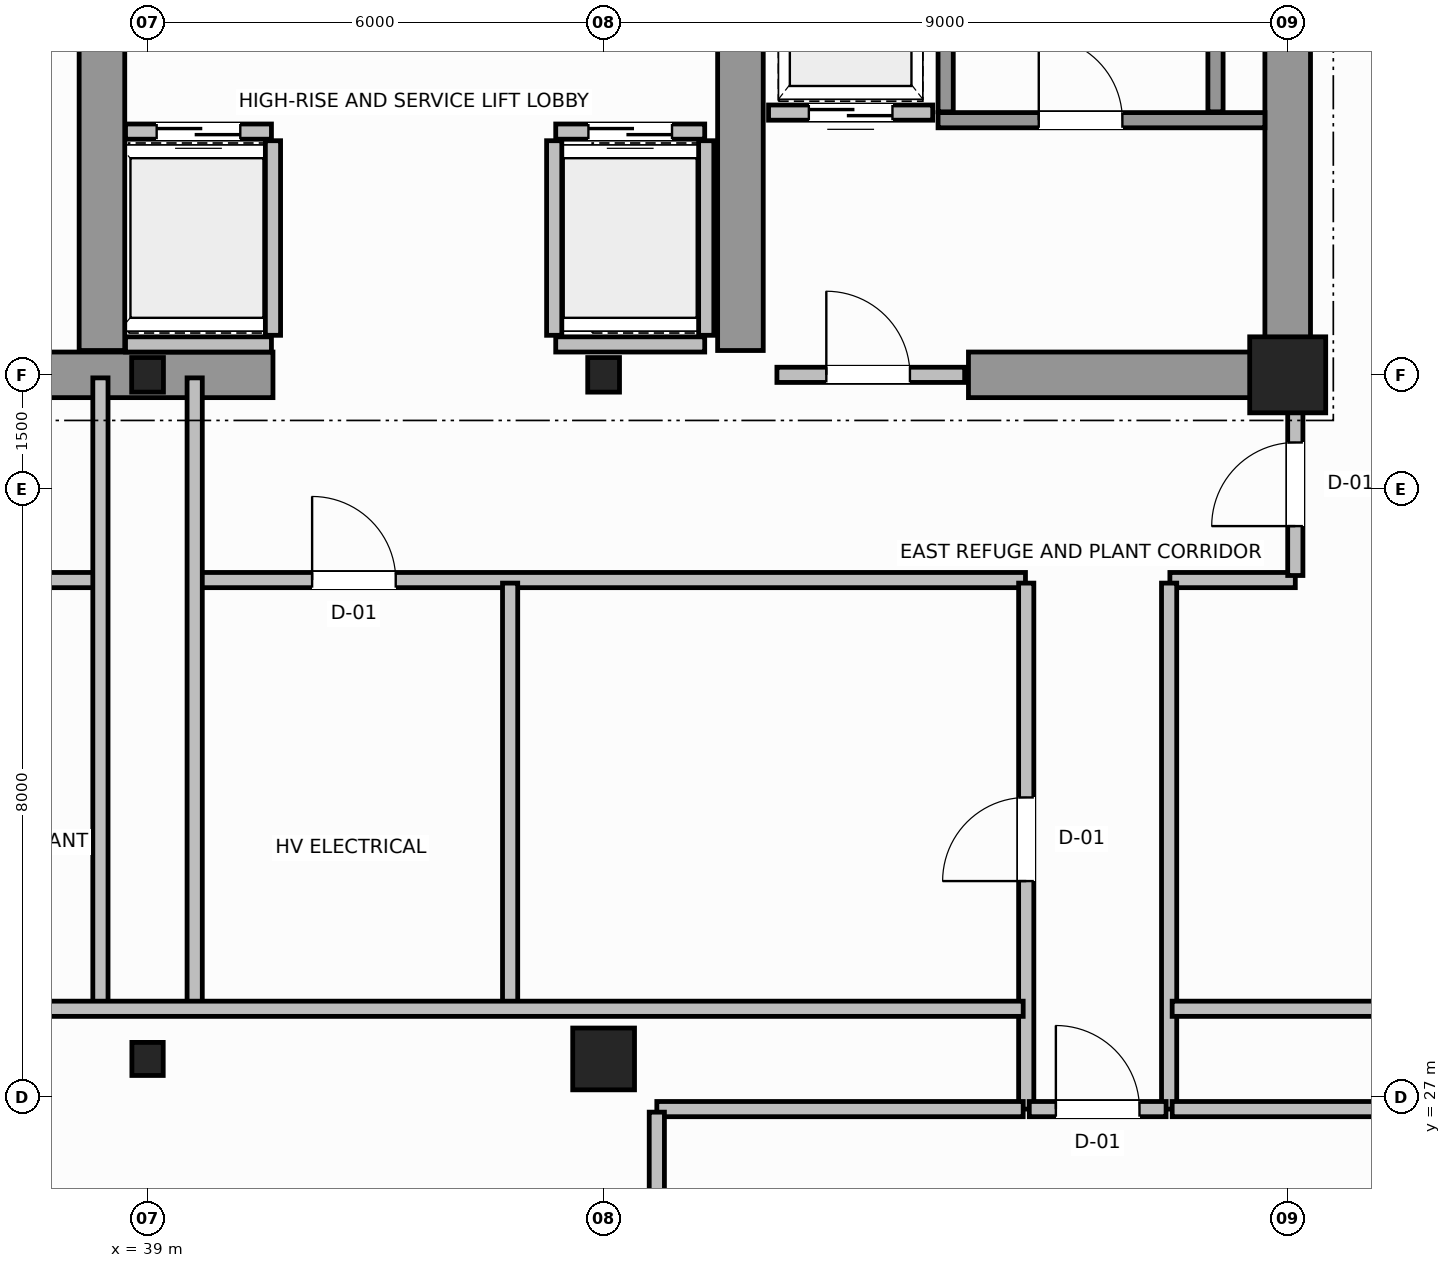
"""IFC4 building model, lengths in metres.
Left out: names, types, materials, properties, quantities, classifications, styles, units other than length and angle.
Written with IfcOpenShell. Run it as: python <this file> out.ifc"""

import sys

from ifc_helpers import new_model, si_unit, direction, frame, frame_2d, origin, origin_2d, place, context, subcontext, project, spatial, rectangle, hollow_circle, i_section, extrude, source, transform, mapped, element, fill, save


model = new_model("IFC4")
c1 = context("Model", 3, precision=1e-05, world=origin(), true_north=direction((0.0, 1.0)))
c2 = subcontext(c1, "Body", "Model", "MODEL_VIEW")
j1 = project(units=[si_unit("LENGTHUNIT", "METRE"), si_unit("PLANEANGLEUNIT", "RADIAN")], contexts=[c1])
p1 = place(None, origin())
s1 = spatial("IfcSite", under=j1, at=p1, CompositionType="ELEMENT")
p2 = place(p1, origin())
s2 = spatial("IfcBuilding", under=s1, at=p2, CompositionType="ELEMENT")
p3 = place(p2, frame((0.0, 0.0, 218.4)))
s3 = spatial("IfcBuildingStorey", under=s2, at=p3, CompositionType="ELEMENT", Elevation=218.4)
m1 = source(origin(), c2, "Body", "SweptSolid", [
    extrude(i_section(OverallWidth=0.418, OverallDepth=0.455, WebThickness=0.042, FlangeThickness=0.058, FilletRadius=0.015, at=origin_2d()), origin(), (0.0, 0.0, 1.0), 4.8),
])
for number, where, z_axis, x_axis in (
    (1, (39.0, 36.5, 0.0), (0.0, 0.0, 1.0), (1.0, 0.0, 0.0)),
    (2, (45.0, 36.5, 0.0), (0.0, 0.0, 1.0), (1.0, 0.0, 0.0)),
):
    element("IfcColumn", number, at=place(p3, frame(where, z_axis=z_axis, x_axis=x_axis)), inside=s3, PredefinedType="COLUMN", context=c2, shape_type="MappedRepresentation", body=[
        mapped(m1, transform((0.0, 0.0, 0.0), scale=1.0)),
    ])
m2 = source(origin(), c2, "Body", "SweptSolid", [
    extrude(rectangle(XDim=1.0, YDim=1.0, at=origin_2d()), origin(), (0.0, 0.0, 1.0), 4.8),
])
p4 = place(p3, frame((54.0, 36.5, 0.0), z_axis=(0.0, 0.0, 1.0), x_axis=(1.0, 0.0, 0.0)))
e3 = element("IfcColumn", 3, at=p4, inside=s3, PredefinedType="COLUMN", context=c2, shape_type="MappedRepresentation", body=[
    mapped(m2, transform((0.0, 0.0, 0.0), scale=1.0)),
])
m3 = source(origin(), c2, "Body", "SweptSolid", [
    extrude(i_section(OverallWidth=0.412, OverallDepth=0.435, WebThickness=0.036, FlangeThickness=0.05, FilletRadius=0.015, at=origin_2d()), origin(), (0.0, 0.0, 1.0), 4.8),
])
p5 = place(p3, frame((39.0, 27.5, 0.0), z_axis=(0.0, 0.0, 1.0), x_axis=(1.0, 0.0, 0.0)))
e4 = element("IfcColumn", 4, at=p5, inside=s3, PredefinedType="COLUMN", context=c2, shape_type="MappedRepresentation", body=[
    mapped(m3, transform((0.0, 0.0, 0.0), scale=1.0)),
])
m4 = source(origin(), c2, "Body", "SweptSolid", [
    extrude(hollow_circle(Radius=0.406, WallThickness=0.04, at=origin_2d()), origin(), (0.0, 0.0, 1.0), 4.8),
])
p6 = place(p3, frame((45.0, 27.5, 0.0), z_axis=(0.0, 0.0, 1.0), x_axis=(1.0, 0.0, 0.0)))
e5 = element("IfcColumn", 5, at=p6, inside=s3, PredefinedType="COLUMN", context=c2, shape_type="MappedRepresentation", body=[
    mapped(m4, transform((0.0, 0.0, 0.0), scale=1.0)),
])
p7 = place(p3, frame((54.0, 36.5, 0.0), z_axis=(0.0, 0.0, 1.0), x_axis=(0.0, 1.0, 0.0)))
e6 = element("IfcWall", 6, at=p7, inside=s3, PredefinedType="SHEAR", context=c2, shape_type="SweptSolid", body=[
    extrude(rectangle(XDim=14.5, YDim=0.6, at=frame_2d((7.25, 0.0))), origin(), (0.0, 0.0, 1.0), 4.8),
])
p8 = place(p3, frame((36.15, 36.5, 0.0), z_axis=(0.0, 0.0, 1.0), x_axis=(1.0, 0.0, 0.0)))
e7 = element("IfcWall", 7, at=p8, inside=s3, PredefinedType="SHEAR", context=c2, shape_type="SweptSolid", body=[
    extrude(rectangle(XDim=4.5, YDim=0.6, at=frame_2d((2.25, 0.0))), origin(), (0.0, 0.0, 1.0), 4.8),
])
p9 = place(p3, frame((49.8, 36.5, 0.0), z_axis=(0.0, 0.0, 1.0), x_axis=(1.0, 0.0, 0.0)))
e8 = element("IfcWall", 8, at=p9, inside=s3, PredefinedType="SHEAR", context=c2, shape_type="SweptSolid", body=[
    extrude(rectangle(XDim=3.88, YDim=0.6, at=frame_2d((1.94, 0.0))), origin(), (0.0, 0.0, 1.0), 3.54),
])
p10 = place(p3, frame((38.4, 36.82, 0.0), z_axis=(0.0, 0.0, 1.0), x_axis=(0.0, 1.0, 0.0)))
e9 = element("IfcWall", 9, at=p10, inside=s3, PredefinedType="SHEAR", context=c2, shape_type="SweptSolid", body=[
    extrude(rectangle(XDim=9.38, YDim=0.6, at=frame_2d((4.69, 0.0))), origin(), (0.0, 0.0, 1.0), 4.8),
])
p11 = place(p10, frame((4.05, 0.0, 0.0)))
e10 = element("IfcOpeningElement", 10, at=p11, cuts=e9, PredefinedType="OPENING", context=c2, shape_type="SweptSolid", body=[
    extrude(rectangle(XDim=1.1, YDim=2.15, at=frame_2d((0.55, 1.075))), frame((0.0, 0.31, 0.0), z_axis=(0.0, -1.0, 0.0), x_axis=(1.0, 0.0, 0.0)), (0.0, 0.0, 1.0), 0.62),
])
p12 = place(p3, frame((46.8, 36.82, 0.0), z_axis=(0.0, 0.0, 1.0), x_axis=(0.0, 1.0, 0.0)))
e11 = element("IfcWall", 11, at=p12, inside=s3, PredefinedType="SHEAR", context=c2, shape_type="SweptSolid", body=[
    extrude(rectangle(XDim=9.38, YDim=0.6, at=frame_2d((4.69, 0.0))), origin(), (0.0, 0.0, 1.0), 4.8),
])
p13 = place(p3, frame((49.4, 39.85, 0.0), z_axis=(0.0, 0.0, 1.0), x_axis=(1.0, 0.0, 0.0)))
e12 = element("IfcWall", 12, at=p13, inside=s3, PredefinedType="SOLIDWALL", context=c2, shape_type="SweptSolid", body=[
    extrude(rectangle(XDim=4.3, YDim=0.2, at=frame_2d((2.15, 0.0))), origin(), (0.0, 0.0, 1.0), 4.8),
])
p14 = place(p13, frame((1.325, 0.0, 0.0)))
e13 = element("IfcOpeningElement", 13, at=p14, cuts=e12, PredefinedType="OPENING", context=c2, shape_type="SweptSolid", body=[
    extrude(rectangle(XDim=1.1, YDim=2.15, at=frame_2d((0.55, 1.075))), frame((0.0, 0.11, 0.0), z_axis=(0.0, -1.0, 0.0), x_axis=(1.0, 0.0, 0.0)), (0.0, 0.0, 1.0), 0.22),
])
for number, where, z_axis, x_axis in (
    (14, (49.5, 39.96, 0.0), (0.0, 0.0, 1.0), (0.0, 1.0, 0.0)),
    (15, (53.05, 39.96, 0.0), (0.0, 0.0, 1.0), (0.0, 1.0, 0.0)),
):
    element("IfcWall", number, at=place(p3, frame(where, z_axis=z_axis, x_axis=x_axis)), inside=s3, PredefinedType="SOLIDWALL", context=c2, shape_type="SweptSolid", body=[
        extrude(rectangle(XDim=9.93, YDim=0.2, at=frame_2d((4.965, 0.0))), origin(), (0.0, 0.0, 1.0), 4.8),
    ])
p15 = place(p3, frame((47.28, 36.5, 0.0), z_axis=(0.0, 0.0, 1.0), x_axis=(1.0, 0.0, 0.0)))
e16 = element("IfcWall", 16, at=p15, inside=s3, PredefinedType="SOLIDWALL", context=c2, shape_type="SweptSolid", body=[
    extrude(rectangle(XDim=2.47, YDim=0.2, at=frame_2d((1.235, 0.0))), origin(), (0.0, 0.0, 1.0), 3.53),
])
p16 = place(p15, frame((0.65, 0.0, 0.0)))
e17 = element("IfcOpeningElement", 17, at=p16, cuts=e16, PredefinedType="OPENING", context=c2, shape_type="SweptSolid", body=[
    extrude(rectangle(XDim=1.1, YDim=2.15, at=frame_2d((0.55, 1.075))), frame((0.0, 0.11, 0.0), z_axis=(0.0, -1.0, 0.0), x_axis=(1.0, 0.0, 0.0)), (0.0, 0.0, 1.0), 0.22),
])
p17 = place(p3, frame((38.71, 39.7, 0.0), z_axis=(0.0, 0.0, 1.0), x_axis=(1.0, 0.0, 0.0)))
e18 = element("IfcWall", 18, at=p17, inside=s3, PredefinedType="SOLIDWALL", context=c2, shape_type="SweptSolid", body=[
    extrude(rectangle(XDim=1.92, YDim=0.2, at=frame_2d((0.96, 0.0))), origin(), (0.0, 0.0, 1.0), 4.54),
])
p18 = place(p17, frame((0.41, 0.0, 0.0)))
e19 = element("IfcOpeningElement", 19, at=p18, cuts=e18, PredefinedType="OPENING", context=c2, shape_type="SweptSolid", body=[
    extrude(rectangle(XDim=1.1, YDim=2.15, at=frame_2d((0.55, 1.075))), frame((0.0, 0.11, 0.0), z_axis=(0.0, -1.0, 0.0), x_axis=(1.0, 0.0, 0.0)), (0.0, 0.0, 1.0), 0.22),
])
p19 = place(p3, frame((38.71, 36.9, 0.0), z_axis=(0.0, 0.0, 1.0), x_axis=(1.0, 0.0, 0.0)))
e20 = element("IfcWall", 20, at=p19, inside=s3, PredefinedType="SOLIDWALL", context=c2, shape_type="SweptSolid", body=[
    extrude(rectangle(XDim=1.92, YDim=0.2, at=frame_2d((0.96, 0.0))), origin(), (0.0, 0.0, 1.0), 4.54),
])
p20 = place(p3, frame((40.65, 37.02, 0.0), z_axis=(0.0, 0.0, 1.0), x_axis=(0.0, 1.0, 0.0)))
e21 = element("IfcWall", 21, at=p20, inside=s3, PredefinedType="SOLIDWALL", context=c2, shape_type="SweptSolid", body=[
    extrude(rectangle(XDim=2.56, YDim=0.2, at=frame_2d((1.28, 0.0))), origin(), (0.0, 0.0, 1.0), 4.54),
])
p21 = place(p3, frame((44.37, 39.7, 0.0), z_axis=(0.0, 0.0, 1.0), x_axis=(1.0, 0.0, 0.0)))
e22 = element("IfcWall", 22, at=p21, inside=s3, PredefinedType="SOLIDWALL", context=c2, shape_type="SweptSolid", body=[
    extrude(rectangle(XDim=1.96, YDim=0.2, at=frame_2d((0.98, 0.0))), origin(), (0.0, 0.0, 1.0), 4.54),
])
p22 = place(p21, frame((0.43, 0.0, 0.0)))
e23 = element("IfcOpeningElement", 23, at=p22, cuts=e22, PredefinedType="OPENING", context=c2, shape_type="SweptSolid", body=[
    extrude(rectangle(XDim=1.1, YDim=2.15, at=frame_2d((0.55, 1.075))), frame((0.0, 0.11, 0.0), z_axis=(0.0, -1.0, 0.0), x_axis=(1.0, 0.0, 0.0)), (0.0, 0.0, 1.0), 0.22),
])
p23 = place(p3, frame((44.37, 36.9, 0.0), z_axis=(0.0, 0.0, 1.0), x_axis=(1.0, 0.0, 0.0)))
e24 = element("IfcWall", 24, at=p23, inside=s3, PredefinedType="SOLIDWALL", context=c2, shape_type="SweptSolid", body=[
    extrude(rectangle(XDim=1.96, YDim=0.2, at=frame_2d((0.98, 0.0))), origin(), (0.0, 0.0, 1.0), 3.53),
])
for number, where, z_axis, x_axis in (
    (25, (44.35, 37.02, 0.0), (0.0, 0.0, 1.0), (0.0, 1.0, 0.0)),
    (26, (46.35, 37.02, 0.0), (0.0, 0.0, 1.0), (0.0, 1.0, 0.0)),
):
    element("IfcWall", number, at=place(p3, frame(where, z_axis=z_axis, x_axis=x_axis)), inside=s3, PredefinedType="SOLIDWALL", context=c2, shape_type="SweptSolid", body=[
        extrude(rectangle(XDim=2.56, YDim=0.2, at=frame_2d((1.28, 0.0))), origin(), (0.0, 0.0, 1.0), 4.54),
    ])
p24 = place(p3, frame((47.17, 39.95, 0.0), z_axis=(0.0, 0.0, 1.0), x_axis=(1.0, 0.0, 0.0)))
e27 = element("IfcWall", 27, at=p24, inside=s3, PredefinedType="SOLIDWALL", context=c2, shape_type="SweptSolid", body=[
    extrude(rectangle(XDim=2.16, YDim=0.2, at=frame_2d((1.08, 0.0))), origin(), (0.0, 0.0, 1.0), 4.54),
])
p25 = place(p24, frame((0.53, 0.0, 0.0)))
e28 = element("IfcOpeningElement", 28, at=p25, cuts=e27, PredefinedType="OPENING", context=c2, shape_type="SweptSolid", body=[
    extrude(rectangle(XDim=1.1, YDim=2.15, at=frame_2d((0.55, 1.075))), frame((0.0, 0.11, 0.0), z_axis=(0.0, -1.0, 0.0), x_axis=(1.0, 0.0, 0.0)), (0.0, 0.0, 1.0), 0.22),
])
p26 = place(p3, frame((29.64, 33.8, 0.0), z_axis=(0.0, 0.0, 1.0), x_axis=(1.0, 0.0, 0.0)))
e29 = element("IfcWall", 29, at=p26, inside=s3, PredefinedType="SOLIDWALL", context=c2, shape_type="SweptSolid", body=[
    extrude(rectangle(XDim=8.72, YDim=0.2, at=frame_2d((4.36, 0.0))), origin(), (0.0, 0.0, 1.0), 4.13),
])
p27 = place(p26, frame((3.8, 0.0, 0.0)))
e30 = element("IfcOpeningElement", 30, at=p27, cuts=e29, PredefinedType="OPENING", context=c2, shape_type="SweptSolid", body=[
    extrude(rectangle(XDim=1.1, YDim=2.15, at=frame_2d((0.55, 1.075))), frame((0.0, 0.11, 0.0), z_axis=(0.0, -1.0, 0.0), x_axis=(1.0, 0.0, 0.0)), (0.0, 0.0, 1.0), 0.22),
])
p28 = place(p3, frame((39.64, 33.8, 0.0), z_axis=(0.0, 0.0, 1.0), x_axis=(1.0, 0.0, 0.0)))
e31 = element("IfcWall", 31, at=p28, inside=s3, PredefinedType="SOLIDWALL", context=c2, shape_type="SweptSolid", body=[
    extrude(rectangle(XDim=10.91, YDim=0.2, at=frame_2d((5.455, 0.0))), origin(), (0.0, 0.0, 1.0), 4.13),
])
p29 = place(p28, frame((1.525, 0.0, 0.0)))
e32 = element("IfcOpeningElement", 32, at=p29, cuts=e31, PredefinedType="OPENING", context=c2, shape_type="SweptSolid", body=[
    extrude(rectangle(XDim=1.1, YDim=2.15, at=frame_2d((0.55, 1.075))), frame((0.0, 0.11, 0.0), z_axis=(0.0, -1.0, 0.0), x_axis=(1.0, 0.0, 0.0)), (0.0, 0.0, 1.0), 0.22),
])
p30 = place(p3, frame((52.45, 33.8, 0.0), z_axis=(0.0, 0.0, 1.0), x_axis=(1.0, 0.0, 0.0)))
e33 = element("IfcWall", 33, at=p30, inside=s3, PredefinedType="SOLIDWALL", context=c2, shape_type="SweptSolid", body=[
    extrude(rectangle(XDim=1.65, YDim=0.2, at=frame_2d((0.825, 0.0))), origin(), (0.0, 0.0, 1.0), 4.13),
])
p31 = place(p3, frame((54.1, 33.86, 0.0), z_axis=(0.0, 0.0, 1.0), x_axis=(0.0, 1.0, 0.0)))
e34 = element("IfcWall", 34, at=p31, inside=s3, PredefinedType="SOLIDWALL", context=c2, shape_type="SweptSolid", body=[
    extrude(rectangle(XDim=2.58, YDim=0.2, at=frame_2d((1.29, 0.0))), origin(), (0.0, 0.0, 1.0), 4.54),
])
p32 = place(p31, frame((0.65, 0.0, 0.0)))
e35 = element("IfcOpeningElement", 35, at=p32, cuts=e34, PredefinedType="OPENING", context=c2, shape_type="SweptSolid", body=[
    extrude(rectangle(XDim=1.1, YDim=2.15, at=frame_2d((0.55, 1.075))), frame((0.0, 0.11, 0.0), z_axis=(0.0, -1.0, 0.0), x_axis=(1.0, 0.0, 0.0)), (0.0, 0.0, 1.0), 0.22),
])
p33 = place(p3, frame((50.56, 26.84, 0.0), z_axis=(0.0, 0.0, 1.0), x_axis=(0.0, 1.0, 0.0)))
e36 = element("IfcWall", 36, at=p33, inside=s3, PredefinedType="SOLIDWALL", context=c2, shape_type="SweptSolid", body=[
    extrude(rectangle(XDim=6.92, YDim=0.2, at=frame_2d((3.46, 0.0))), origin(), (0.0, 0.0, 1.0), 4.54),
])
p34 = place(p33, frame((3.0, 0.0, 0.0)))
e37 = element("IfcOpeningElement", 37, at=p34, cuts=e36, PredefinedType="OPENING", context=c2, shape_type="SweptSolid", body=[
    extrude(rectangle(XDim=1.1, YDim=2.15, at=frame_2d((0.55, 1.075))), frame((0.0, 0.11, 0.0), z_axis=(0.0, -1.0, 0.0), x_axis=(1.0, 0.0, 0.0)), (0.0, 0.0, 1.0), 0.22),
])
p35 = place(p3, frame((52.44, 26.84, 0.0), z_axis=(0.0, 0.0, 1.0), x_axis=(0.0, 1.0, 0.0)))
e38 = element("IfcWall", 38, at=p35, inside=s3, PredefinedType="SOLIDWALL", context=c2, shape_type="SweptSolid", body=[
    extrude(rectangle(XDim=6.92, YDim=0.2, at=frame_2d((3.46, 0.0))), origin(), (0.0, 0.0, 1.0), 4.54),
])
p36 = place(p3, frame((50.6, 26.84, 0.0), z_axis=(0.0, 0.0, 1.0), x_axis=(1.0, 0.0, 0.0)))
e39 = element("IfcWall", 39, at=p36, inside=s3, PredefinedType="SOLIDWALL", context=c2, shape_type="SweptSolid", body=[
    extrude(rectangle(XDim=1.8, YDim=0.2, at=frame_2d((0.9, 0.0))), origin(), (0.0, 0.0, 1.0), 4.54),
])
p37 = place(p36, frame((0.35, 0.0, 0.0)))
e40 = element("IfcOpeningElement", 40, at=p37, cuts=e39, PredefinedType="OPENING", context=c2, shape_type="SweptSolid", body=[
    extrude(rectangle(XDim=1.1, YDim=2.15, at=frame_2d((0.55, 1.075))), frame((0.0, 0.11, 0.0), z_axis=(0.0, -1.0, 0.0), x_axis=(1.0, 0.0, 0.0)), (0.0, 0.0, 1.0), 0.22),
])
for number, where, z_axis, x_axis in (
    (41, (38.38, 28.16, 0.0), (0.0, 0.0, 1.0), (0.0, 1.0, 0.0)),
    (42, (39.62, 28.16, 0.0), (0.0, 0.0, 1.0), (0.0, 1.0, 0.0)),
):
    element("IfcWall", number, at=place(p3, frame(where, z_axis=z_axis, x_axis=x_axis)), inside=s3, PredefinedType="SOLIDWALL", context=c2, shape_type="SweptSolid", body=[
        extrude(rectangle(XDim=8.3, YDim=0.2, at=frame_2d((4.15, 0.0))), origin(), (0.0, 0.0, 1.0), 4.54),
    ])
p38 = place(p3, frame((43.77, 28.16, 0.0), z_axis=(0.0, 0.0, 1.0), x_axis=(0.0, 1.0, 0.0)))
e43 = element("IfcWall", 43, at=p38, inside=s3, PredefinedType="SOLIDWALL", context=c2, shape_type="SweptSolid", body=[
    extrude(rectangle(XDim=5.6, YDim=0.2, at=frame_2d((2.8, 0.0))), origin(), (0.0, 0.0, 1.0), 4.54),
])
p39 = place(p3, frame((17.48, 28.16, 0.0), z_axis=(0.0, 0.0, 1.0), x_axis=(1.0, 0.0, 0.0)))
e44 = element("IfcWall", 44, at=p39, inside=s3, PredefinedType="SOLIDWALL", context=c2, shape_type="SweptSolid", body=[
    extrude(rectangle(XDim=33.04, YDim=0.2, at=frame_2d((16.52, 0.0))), origin(), (0.0, 0.0, 1.0), 4.54),
])
p40 = place(p3, frame((52.48, 28.16, 0.0), z_axis=(0.0, 0.0, 1.0), x_axis=(1.0, 0.0, 0.0)))
e45 = element("IfcWall", 45, at=p40, inside=s3, PredefinedType="SOLIDWALL", context=c2, shape_type="SweptSolid", body=[
    extrude(rectangle(XDim=6.681, YDim=0.2, at=frame_2d((3.34, 0.0))), origin(), (0.0, 0.0, 1.0), 4.54),
])
p41 = place(p3, frame((45.7, 26.84, 0.0), z_axis=(0.0, 0.0, 1.0), x_axis=(1.0, 0.0, 0.0)))
e46 = element("IfcWall", 46, at=p41, inside=s3, PredefinedType="SOLIDWALL", context=c2, shape_type="SweptSolid", body=[
    extrude(rectangle(XDim=4.82, YDim=0.2, at=frame_2d((2.41, 0.0))), origin(), (0.0, 0.0, 1.0), 4.54),
])
p42 = place(p3, frame((52.48, 26.84, 0.0), z_axis=(0.0, 0.0, 1.0), x_axis=(1.0, 0.0, 0.0)))
e47 = element("IfcWall", 47, at=p42, inside=s3, PredefinedType="SOLIDWALL", context=c2, shape_type="SweptSolid", body=[
    extrude(rectangle(XDim=6.437, YDim=0.2, at=frame_2d((3.218, 0.0))), origin(), (0.0, 0.0, 1.0), 4.54),
])
p43 = place(p3, frame((45.7, 18.62, 0.0), z_axis=(0.0, 0.0, 1.0), x_axis=(0.0, 1.0, 0.0)))
e48 = element("IfcWall", 48, at=p43, inside=s3, PredefinedType="SOLIDWALL", context=c2, shape_type="SweptSolid", body=[
    extrude(rectangle(XDim=8.18, YDim=0.2, at=frame_2d((4.09, 0.0))), origin(), (0.0, 0.0, 1.0), 4.54),
])
m5 = source(origin(), c2, "Body", "SweptSolid", [
    extrude(rectangle(XDim=1.1, YDim=2.15, at=frame_2d((0.55, 1.075))), frame((0.0, 0.025, 0.0), z_axis=(0.0, -1.0, 0.0), x_axis=(1.0, 0.0, 0.0)), (0.0, 0.0, 1.0), 0.05),
])
p44 = place(p14, origin())
e49 = element("IfcDoor", 49, at=p44, inside=s3, OperationType="SINGLE_SWING_RIGHT", PredefinedType="DOOR", context=c2, shape_type="MappedRepresentation", body=[
    mapped(m5, transform((0.0, 0.0, 0.0), scale=1.0)),
])
fill(e13, e49)
p45 = place(p16, origin())
e50 = element("IfcDoor", 50, at=p45, inside=s3, OperationType="SINGLE_SWING_LEFT", PredefinedType="DOOR", context=c2, shape_type="MappedRepresentation", body=[
    mapped(m5, transform((0.0, 0.0, 0.0), scale=1.0)),
])
fill(e17, e50)
p46 = place(p18, origin())
e51 = element("IfcDoor", 51, at=p46, inside=s3, OperationType="DOUBLE_DOOR_SLIDING", PredefinedType="DOOR", context=c2, shape_type="MappedRepresentation", body=[
    mapped(m5, transform((0.0, 0.0, 0.0), scale=1.0)),
])
fill(e19, e51)
p47 = place(p22, origin())
e52 = element("IfcDoor", 52, at=p47, inside=s3, OperationType="DOUBLE_DOOR_SLIDING", PredefinedType="DOOR", context=c2, shape_type="MappedRepresentation", body=[
    mapped(m5, transform((0.0, 0.0, 0.0), scale=1.0)),
])
fill(e23, e52)
p48 = place(p25, origin())
e53 = element("IfcDoor", 53, at=p48, inside=s3, OperationType="DOUBLE_DOOR_SLIDING", PredefinedType="DOOR", context=c2, shape_type="MappedRepresentation", body=[
    mapped(m5, transform((0.0, 0.0, 0.0), scale=1.0)),
])
fill(e28, e53)
p49 = place(p32, origin())
e54 = element("IfcDoor", 54, at=p49, inside=s3, OperationType="SINGLE_SWING_RIGHT", PredefinedType="DOOR", context=c2, shape_type="MappedRepresentation", body=[
    mapped(m5, transform((0.0, 0.0, 0.0), scale=1.0)),
])
fill(e35, e54)
p50 = place(p34, origin())
e55 = element("IfcDoor", 55, at=p50, inside=s3, OperationType="SINGLE_SWING_LEFT", PredefinedType="DOOR", context=c2, shape_type="MappedRepresentation", body=[
    mapped(m5, transform((0.0, 0.0, 0.0), scale=1.0)),
])
fill(e37, e55)
p51 = place(p37, origin())
e56 = element("IfcDoor", 56, at=p51, inside=s3, OperationType="SINGLE_SWING_RIGHT", PredefinedType="DOOR", context=c2, shape_type="MappedRepresentation", body=[
    mapped(m5, transform((0.0, 0.0, 0.0), scale=1.0)),
])
fill(e40, e56)
p52 = place(p29, origin())
e57 = element("IfcDoor", 57, at=p52, inside=s3, OperationType="SINGLE_SWING_LEFT", PredefinedType="DOOR", context=c2, shape_type="MappedRepresentation", body=[
    mapped(m5, transform((0.0, 0.0, 0.0), scale=1.0)),
])
fill(e32, e57)
save(model, sys.argv[1])
